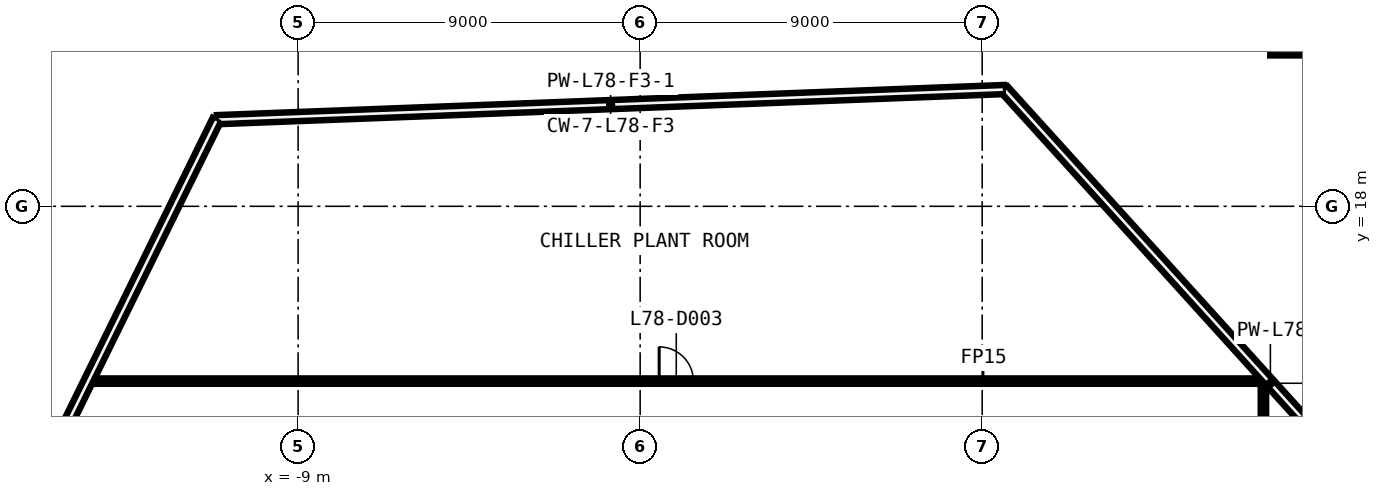
"""IFC4 building model, lengths in metres.
Left out: names, types, materials, properties, quantities, classifications, styles, units other than length and angle.
Written with IfcOpenShell. Run it as: python <this file> out.ifc"""

import sys

from ifc_helpers import new_model, si_unit, direction, frame, frame_2d, origin, origin_2d, place, context, subcontext, project, spatial, rectangle, hollow_rectangle, extrude, element, fill, save


model = new_model("IFC4")
c1 = context("Model", 3, precision=1e-05, world=origin(), true_north=direction((0.0, 1.0)))
c2 = subcontext(c1, "Body", "Model", "MODEL_VIEW")
j1 = project(units=[si_unit("LENGTHUNIT", "METRE"), si_unit("PLANEANGLEUNIT", "RADIAN")], contexts=[c1])
p1 = place(None, origin())
s1 = spatial("IfcSite", under=j1, at=p1, CompositionType="ELEMENT")
p2 = place(p1, origin())
s2 = spatial("IfcBuilding", under=s1, at=p2, CompositionType="ELEMENT")
p3 = place(p2, frame((0.0, 0.0, 363.2)))
s3 = spatial("IfcBuildingStorey", under=s2, at=p3, CompositionType="ELEMENT", Elevation=363.2)
p4 = place(p3, frame((17.276, 22.666, 0.0), z_axis=(0.0, 0.0, 1.0), x_axis=(1.0, 0.0, 0.0)))
e1 = element("IfcColumn", 1, at=p4, inside=s3, PredefinedType="COLUMN", context=c2, shape_type="SweptSolid", body=[
    extrude(hollow_rectangle(XDim=1.4, YDim=1.4, WallThickness=0.06, at=origin_2d()), origin(), (0.0, 0.0, 1.0), 4.2),
])
p5 = place(p3, frame((-14.5, 13.4, 0.0), z_axis=(0.0, 0.0, 1.0), x_axis=(1.0, 0.0, 0.0)))
e2 = element("IfcWall", 2, at=p5, inside=s3, PredefinedType="PARTITIONING", context=c2, shape_type="SweptSolid", body=[
    extrude(rectangle(XDim=30.975, YDim=0.15, at=frame_2d((15.487, 0.0))), origin(), (0.0, 0.0, 1.0), 3.8),
])
p6 = place(p5, frame((15.0, 0.0, 0.0)))
e3 = element("IfcOpeningElement", 3, at=p6, cuts=e2, PredefinedType="OPENING", context=c2, shape_type="SweptSolid", body=[
    extrude(rectangle(XDim=0.9, YDim=2.1, at=frame_2d((0.45, 1.05))), frame((0.0, 0.085, 0.0), z_axis=(0.0, -1.0, 0.0), x_axis=(1.0, 0.0, 0.0)), (0.0, 0.0, 1.0), 0.17),
])
p7 = place(p3, frame((16.4, -9.676, 0.0), z_axis=(0.0, 0.0, 1.0), x_axis=(0.0, 1.0, 0.0)))
e4 = element("IfcWall", 4, at=p7, inside=s3, PredefinedType="PARTITIONING", context=c2, shape_type="SweptSolid", body=[
    extrude(rectangle(XDim=23.001, YDim=0.15, at=frame_2d((11.5, 0.0))), origin(), (0.0, 0.0, 1.0), 3.8),
])
p8 = place(p3, frame((23.583, 5.614, 0.0), z_axis=(0.0, 0.0, 1.0), x_axis=(-0.671256862452, 0.741224813812, 0.0)))
e5 = element("IfcWall", 5, at=p8, inside=s3, PredefinedType="SOLIDWALL", context=c2, shape_type="SweptSolid", body=[
    extrude(rectangle(XDim=20.856, YDim=0.25, at=frame_2d((10.428, 0.0))), origin(), (0.0, 0.0, 1.0), 3.8),
])
p9 = place(p3, frame((9.583, 21.073, 0.0), z_axis=(0.0, 0.0, 1.0), x_axis=(-0.999269048775, -0.038227845343, 0.0)))
e6 = element("IfcWall", 6, at=p9, inside=s3, PredefinedType="SOLIDWALL", context=c2, shape_type="SweptSolid", body=[
    extrude(rectangle(XDim=20.737, YDim=0.25, at=frame_2d((10.368, 0.0))), origin(), (0.0, 0.0, 1.0), 3.8),
])
p10 = place(p3, frame((-11.138, 20.28, 0.0), z_axis=(0.0, 0.0, 1.0), x_axis=(-0.441342255748, -0.897338850876, 0.0)))
e7 = element("IfcWall", 7, at=p10, inside=s3, PredefinedType="SOLIDWALL", context=c2, shape_type="SweptSolid", body=[
    extrude(rectangle(XDim=28.805, YDim=0.25, at=frame_2d((14.403, 0.0))), origin(), (0.0, 0.0, 1.0), 3.8),
])
p11 = place(p6, origin())
e8 = element("IfcDoor", 8, at=p11, inside=s3, OperationType="SINGLE_SWING_RIGHT", PredefinedType="DOOR", context=c2, shape_type="SweptSolid", body=[
    extrude(rectangle(XDim=0.9, YDim=2.1, at=frame_2d((0.45, 1.05))), frame((0.0, 0.025, 0.0), z_axis=(0.0, -1.0, 0.0), x_axis=(1.0, 0.0, 0.0)), (0.0, 0.0, 1.0), 0.05),
])
fill(e3, e8)
save(model, sys.argv[1])
